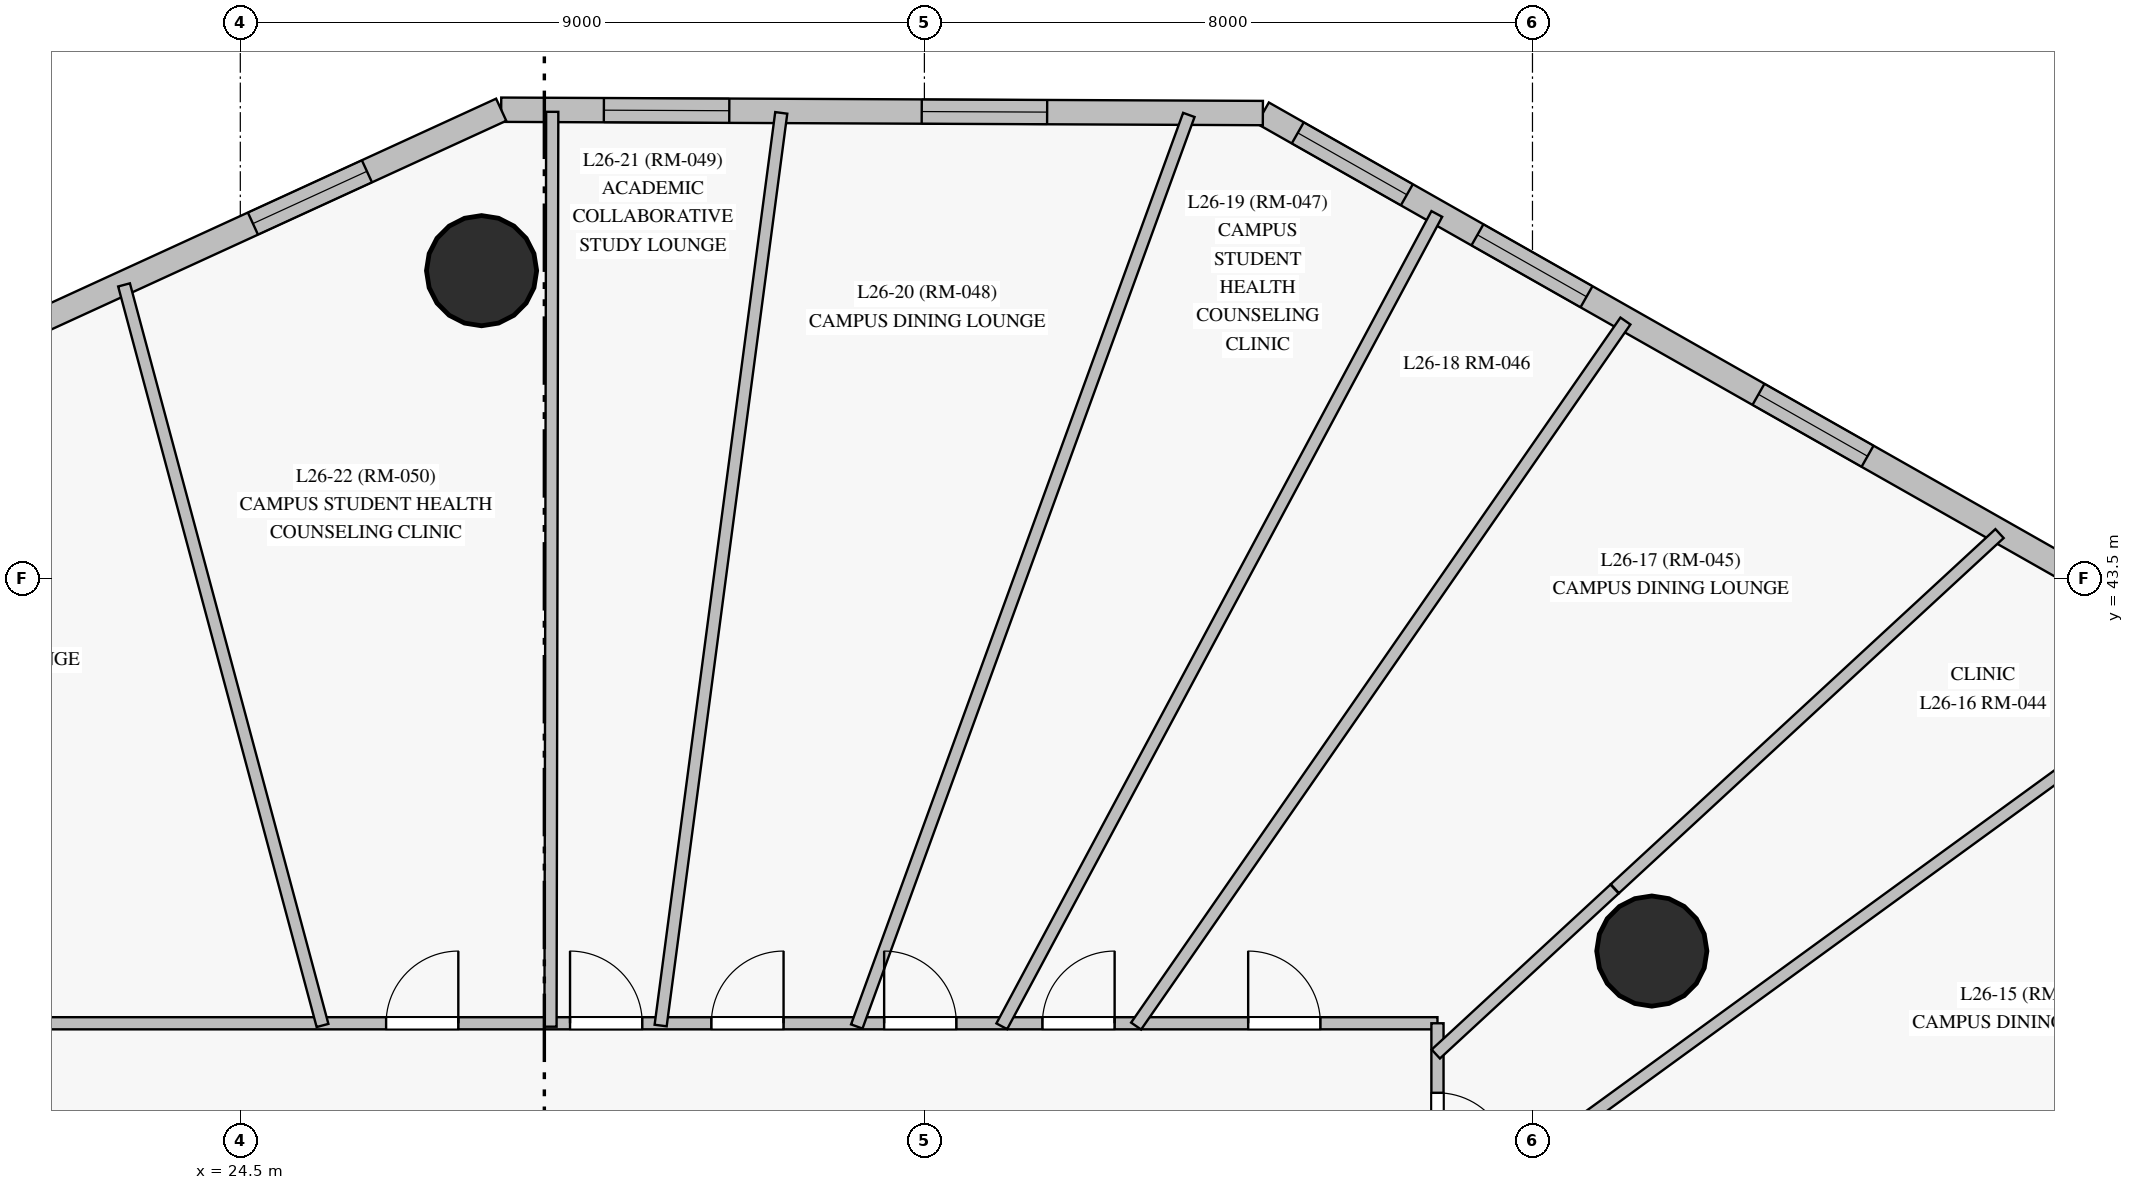
"""IFC4 building model, lengths in metres.
Left out: names, types, materials, properties, quantities, classifications, styles, units other than length and angle.
Written with IfcOpenShell. Run it as: python <this file> out.ifc"""

import sys

from ifc_helpers import new_model, si_unit, direction, frame, frame_2d, origin, origin_with_axes, origin_2d, place, context, subcontext, project, spatial, rectangle, circle, extrude, source, transform, mapped, element, fill, save


model = new_model("IFC4")
c1 = context("Model", 3, precision=1e-05, world=origin(), true_north=direction((0.0, 1.0)))
c2 = subcontext(c1, "Body", "Model", "MODEL_VIEW")
j1 = project(units=[si_unit("LENGTHUNIT", "METRE"), si_unit("PLANEANGLEUNIT", "RADIAN")], contexts=[c1])
p1 = place(None, origin())
s1 = spatial("IfcSite", under=j1, at=p1, CompositionType="ELEMENT")
p2 = place(p1, origin())
s2 = spatial("IfcBuilding", under=s1, at=p2, CompositionType="ELEMENT")
p3 = place(p2, frame((0.0, 0.0, 99.25)))
s3 = spatial("IfcBuildingStorey", under=s2, at=p3, CompositionType="ELEMENT", Elevation=99.25)
m1 = source(origin_with_axes(), c2, "Body", "SweptSolid", [
    extrude(circle(Radius=0.725, at=origin_2d()), origin(), (0.0, 0.0, 1.0), 3.05),
])
for number, where, z_axis, x_axis in (
    (1, (43.07, 38.6, 0.0), (0.0, 0.0, 1.0), (1.0, 0.0, 0.0)),
    (2, (27.674, 47.551, 0.0), (0.0, 0.0, 1.0), (1.0, 0.0, 0.0)),
):
    element("IfcColumn", number, at=place(p3, frame(where, z_axis=z_axis, x_axis=x_axis)), inside=s3, PredefinedType="COLUMN", context=c2, shape_type="MappedRepresentation", body=[
        mapped(m1, transform((0.0, 0.0, 0.0), scale=1.0)),
    ])
p4 = place(p3, frame((48.802, 43.468, 0.0), z_axis=(0.0, 0.0, 1.0), x_axis=(-0.869711119525, 0.49356110926, 0.0)))
e3 = element("IfcWall", 3, at=p4, inside=s3, PredefinedType="SOLIDWALL", context=c2, shape_type="SweptSolid", body=[
    extrude(rectangle(XDim=12.474, YDim=0.32, at=frame_2d((6.237, 0.0))), origin(), (0.0, 0.0, 1.0), 2.825),
])
p5 = place(p4, frame((3.327, 0.0, 0.85)))
e4 = element("IfcOpeningElement", 4, at=p5, cuts=e3, PredefinedType="OPENING", context=c2, shape_type="SweptSolid", body=[
    extrude(rectangle(XDim=1.65, YDim=1.65, at=frame_2d((0.825, 0.825))), frame((0.0, 0.17, 0.0), z_axis=(0.0, -1.0, 0.0), x_axis=(1.0, 0.0, 0.0)), (0.0, 0.0, 1.0), 0.34),
])
p6 = place(p4, frame((7.578, 0.0, 0.85)))
e5 = element("IfcOpeningElement", 5, at=p6, cuts=e3, PredefinedType="OPENING", context=c2, shape_type="SweptSolid", body=[
    extrude(rectangle(XDim=1.65, YDim=1.65, at=frame_2d((0.825, 0.825))), frame((0.0, 0.17, 0.0), z_axis=(0.0, -1.0, 0.0), x_axis=(1.0, 0.0, 0.0)), (0.0, 0.0, 1.0), 0.34),
])
p7 = place(p4, frame((10.296, 0.0, 0.85)))
e6 = element("IfcOpeningElement", 6, at=p7, cuts=e3, PredefinedType="OPENING", context=c2, shape_type="SweptSolid", body=[
    extrude(rectangle(XDim=1.65, YDim=1.65, at=frame_2d((0.825, 0.825))), frame((0.0, 0.17, 0.0), z_axis=(0.0, -1.0, 0.0), x_axis=(1.0, 0.0, 0.0)), (0.0, 0.0, 1.0), 0.34),
])
p8 = place(p3, frame((37.953, 49.625, 0.0), z_axis=(0.0, 0.0, 1.0), x_axis=(-0.999990384138, 0.004385388455, 0.0)))
e7 = element("IfcWall", 7, at=p8, inside=s3, PredefinedType="SOLIDWALL", context=c2, shape_type="SweptSolid", body=[
    extrude(rectangle(XDim=10.021, YDim=0.32, at=frame_2d((5.01, 0.0))), origin(), (0.0, 0.0, 1.0), 2.825),
])
p9 = place(p8, frame((2.838, 0.0, 0.85)))
e8 = element("IfcOpeningElement", 8, at=p9, cuts=e7, PredefinedType="OPENING", context=c2, shape_type="SweptSolid", body=[
    extrude(rectangle(XDim=1.65, YDim=1.65, at=frame_2d((0.825, 0.825))), frame((0.0, 0.17, 0.0), z_axis=(0.0, -1.0, 0.0), x_axis=(1.0, 0.0, 0.0)), (0.0, 0.0, 1.0), 0.34),
])
p10 = place(p8, frame((7.02, 0.0, 0.85)))
e9 = element("IfcOpeningElement", 9, at=p10, cuts=e7, PredefinedType="OPENING", context=c2, shape_type="SweptSolid", body=[
    extrude(rectangle(XDim=1.65, YDim=1.65, at=frame_2d((0.825, 0.825))), frame((0.0, 0.17, 0.0), z_axis=(0.0, -1.0, 0.0), x_axis=(1.0, 0.0, 0.0)), (0.0, 0.0, 1.0), 0.34),
])
p11 = place(p3, frame((27.932, 49.669, 0.0), z_axis=(0.0, 0.0, 1.0), x_axis=(-0.908921945333, -0.416966302345, 0.0)))
e10 = element("IfcWall", 10, at=p11, inside=s3, PredefinedType="SOLIDWALL", context=c2, shape_type="SweptSolid", body=[
    extrude(rectangle(XDim=14.514, YDim=0.32, at=frame_2d((7.257, 0.0))), origin(), (0.0, 0.0, 1.0), 2.825),
])
p12 = place(p11, frame((1.943, 0.0, 0.85)))
e11 = element("IfcOpeningElement", 11, at=p12, cuts=e10, PredefinedType="OPENING", context=c2, shape_type="SweptSolid", body=[
    extrude(rectangle(XDim=1.65, YDim=1.65, at=frame_2d((0.825, 0.825))), frame((0.0, 0.17, 0.0), z_axis=(0.0, -1.0, 0.0), x_axis=(1.0, 0.0, 0.0)), (0.0, 0.0, 1.0), 0.34),
])
p13 = place(p11, frame((6.767, 0.0, 0.85)))
e12 = element("IfcOpeningElement", 12, at=p13, cuts=e10, PredefinedType="OPENING", context=c2, shape_type="SweptSolid", body=[
    extrude(rectangle(XDim=1.65, YDim=1.65, at=frame_2d((0.825, 0.825))), frame((0.0, 0.17, 0.0), z_axis=(0.0, -1.0, 0.0), x_axis=(1.0, 0.0, 0.0)), (0.0, 0.0, 1.0), 0.34),
])
p14 = place(p11, frame((10.357, 0.0, 0.85)))
e13 = element("IfcOpeningElement", 13, at=p14, cuts=e10, PredefinedType="OPENING", context=c2, shape_type="SweptSolid", body=[
    extrude(rectangle(XDim=1.65, YDim=1.65, at=frame_2d((0.825, 0.825))), frame((0.0, 0.17, 0.0), z_axis=(0.0, -1.0, 0.0), x_axis=(1.0, 0.0, 0.0)), (0.0, 0.0, 1.0), 0.34),
])
p15 = place(p3, frame((10.613, 37.65, 0.0), z_axis=(0.0, 0.0, 1.0), x_axis=(1.0, 0.0, 0.0)))
e14 = element("IfcWall", 14, at=p15, inside=s3, PredefinedType="PARTITIONING", context=c2, shape_type="SweptSolid", body=[
    extrude(rectangle(XDim=29.637, YDim=0.16, at=frame_2d((14.819, 0.0))), origin(), (0.0, 0.0, 1.0), 2.325),
])
p16 = place(p15, frame((27.147, 0.0, 0.0)))
e15 = element("IfcOpeningElement", 15, at=p16, cuts=e14, PredefinedType="OPENING", context=c2, shape_type="SweptSolid", body=[
    extrude(rectangle(XDim=0.95, YDim=2.15, at=frame_2d((0.475, 1.075))), frame((0.0, 0.09, 0.0), z_axis=(0.0, -1.0, 0.0), x_axis=(1.0, 0.0, 0.0)), (0.0, 0.0, 1.0), 0.18),
])
p17 = place(p15, frame((24.44, 0.0, 0.0)))
e16 = element("IfcOpeningElement", 16, at=p17, cuts=e14, PredefinedType="OPENING", context=c2, shape_type="SweptSolid", body=[
    extrude(rectangle(XDim=0.95, YDim=2.15, at=frame_2d((0.475, 1.075))), frame((0.0, 0.09, 0.0), z_axis=(0.0, -1.0, 0.0), x_axis=(1.0, 0.0, 0.0)), (0.0, 0.0, 1.0), 0.18),
])
p18 = place(p15, frame((22.358, 0.0, 0.0)))
e17 = element("IfcOpeningElement", 17, at=p18, cuts=e14, PredefinedType="OPENING", context=c2, shape_type="SweptSolid", body=[
    extrude(rectangle(XDim=0.95, YDim=2.15, at=frame_2d((0.475, 1.075))), frame((0.0, 0.09, 0.0), z_axis=(0.0, -1.0, 0.0), x_axis=(1.0, 0.0, 0.0)), (0.0, 0.0, 1.0), 0.18),
])
p19 = place(p15, frame((20.084, 0.0, 0.0)))
e18 = element("IfcOpeningElement", 18, at=p19, cuts=e14, PredefinedType="OPENING", context=c2, shape_type="SweptSolid", body=[
    extrude(rectangle(XDim=0.95, YDim=2.15, at=frame_2d((0.475, 1.075))), frame((0.0, 0.09, 0.0), z_axis=(0.0, -1.0, 0.0), x_axis=(1.0, 0.0, 0.0)), (0.0, 0.0, 1.0), 0.18),
])
p20 = place(p15, frame((18.225, 0.0, 0.0)))
e19 = element("IfcOpeningElement", 19, at=p20, cuts=e14, PredefinedType="OPENING", context=c2, shape_type="SweptSolid", body=[
    extrude(rectangle(XDim=0.95, YDim=2.15, at=frame_2d((0.475, 1.075))), frame((0.0, 0.09, 0.0), z_axis=(0.0, -1.0, 0.0), x_axis=(1.0, 0.0, 0.0)), (0.0, 0.0, 1.0), 0.18),
])
p21 = place(p15, frame((15.805, 0.0, 0.0)))
e20 = element("IfcOpeningElement", 20, at=p21, cuts=e14, PredefinedType="OPENING", context=c2, shape_type="SweptSolid", body=[
    extrude(rectangle(XDim=0.95, YDim=2.15, at=frame_2d((0.475, 1.075))), frame((0.0, 0.09, 0.0), z_axis=(0.0, -1.0, 0.0), x_axis=(1.0, 0.0, 0.0)), (0.0, 0.0, 1.0), 0.18),
])
p22 = place(p15, frame((10.148, 0.0, 0.0)))
e21 = element("IfcOpeningElement", 21, at=p22, cuts=e14, PredefinedType="OPENING", context=c2, shape_type="SweptSolid", body=[
    extrude(rectangle(XDim=0.95, YDim=2.15, at=frame_2d((0.475, 1.075))), frame((0.0, 0.09, 0.0), z_axis=(0.0, -1.0, 0.0), x_axis=(1.0, 0.0, 0.0)), (0.0, 0.0, 1.0), 0.18),
])
p23 = place(p15, frame((7.296, 0.0, 0.0)))
e22 = element("IfcOpeningElement", 22, at=p23, cuts=e14, PredefinedType="OPENING", context=c2, shape_type="SweptSolid", body=[
    extrude(rectangle(XDim=0.95, YDim=2.15, at=frame_2d((0.475, 1.075))), frame((0.0, 0.09, 0.0), z_axis=(0.0, -1.0, 0.0), x_axis=(1.0, 0.0, 0.0)), (0.0, 0.0, 1.0), 0.18),
])
p24 = place(p3, frame((40.25, 37.65, 0.0), z_axis=(0.0, 0.0, 1.0), x_axis=(0.0, -1.0, 0.0)))
e23 = element("IfcWall", 23, at=p24, inside=s3, PredefinedType="PARTITIONING", context=c2, shape_type="SweptSolid", body=[
    extrude(rectangle(XDim=22.3, YDim=0.16, at=frame_2d((11.15, 0.0))), origin(), (0.0, 0.0, 1.0), 2.225),
])
p25 = place(p24, frame((18.866, 0.0, 0.0)))
e24 = element("IfcOpeningElement", 24, at=p25, cuts=e23, PredefinedType="OPENING", context=c2, shape_type="SweptSolid", body=[
    extrude(rectangle(XDim=0.95, YDim=2.15, at=frame_2d((0.475, 1.075))), frame((0.0, 0.09, 0.0), z_axis=(0.0, -1.0, 0.0), x_axis=(1.0, 0.0, 0.0)), (0.0, 0.0, 1.0), 0.18),
])
p26 = place(p24, frame((11.015, 0.0, 0.0)))
e25 = element("IfcOpeningElement", 25, at=p26, cuts=e23, PredefinedType="OPENING", context=c2, shape_type="SweptSolid", body=[
    extrude(rectangle(XDim=0.95, YDim=2.15, at=frame_2d((0.475, 1.075))), frame((0.0, 0.09, 0.0), z_axis=(0.0, -1.0, 0.0), x_axis=(1.0, 0.0, 0.0)), (0.0, 0.0, 1.0), 0.18),
])
p27 = place(p24, frame((8.866, 0.0, 0.0)))
e26 = element("IfcOpeningElement", 26, at=p27, cuts=e23, PredefinedType="OPENING", context=c2, shape_type="SweptSolid", body=[
    extrude(rectangle(XDim=0.95, YDim=2.15, at=frame_2d((0.475, 1.075))), frame((0.0, 0.09, 0.0), z_axis=(0.0, -1.0, 0.0), x_axis=(1.0, 0.0, 0.0)), (0.0, 0.0, 1.0), 0.18),
])
p28 = place(p24, frame((6.84, 0.0, 0.0)))
e27 = element("IfcOpeningElement", 27, at=p28, cuts=e23, PredefinedType="OPENING", context=c2, shape_type="SweptSolid", body=[
    extrude(rectangle(XDim=0.95, YDim=2.15, at=frame_2d((0.475, 1.075))), frame((0.0, 0.09, 0.0), z_axis=(0.0, -1.0, 0.0), x_axis=(1.0, 0.0, 0.0)), (0.0, 0.0, 1.0), 0.18),
])
p29 = place(p24, frame((4.56, 0.0, 0.0)))
e28 = element("IfcOpeningElement", 28, at=p29, cuts=e23, PredefinedType="OPENING", context=c2, shape_type="SweptSolid", body=[
    extrude(rectangle(XDim=0.95, YDim=2.15, at=frame_2d((0.475, 1.075))), frame((0.0, 0.09, 0.0), z_axis=(0.0, -1.0, 0.0), x_axis=(1.0, 0.0, 0.0)), (0.0, 0.0, 1.0), 0.18),
])
p30 = place(p24, frame((0.915, 0.0, 0.0)))
e29 = element("IfcOpeningElement", 29, at=p30, cuts=e23, PredefinedType="OPENING", context=c2, shape_type="SweptSolid", body=[
    extrude(rectangle(XDim=0.95, YDim=2.15, at=frame_2d((0.475, 1.075))), frame((0.0, 0.09, 0.0), z_axis=(0.0, -1.0, 0.0), x_axis=(1.0, 0.0, 0.0)), (0.0, 0.0, 1.0), 0.18),
])
p31 = place(p3, frame((32.61, 37.608, 0.0), z_axis=(0.0, 0.0, 1.0), x_axis=(0.342280552341, 0.939597798789, 0.0)))
e30 = element("IfcWall", 30, at=p31, inside=s3, PredefinedType="PARTITIONING", context=c2, shape_type="SweptSolid", body=[
    extrude(rectangle(XDim=12.763, YDim=0.16, at=frame_2d((6.382, 0.0))), origin(), (0.0, 0.0, 1.0), 2.825),
])
p32 = place(p3, frame((30.03, 37.62, 0.0), z_axis=(0.0, 0.0, 1.0), x_axis=(0.131010891984, 0.991380928897, 0.0)))
e31 = element("IfcWall", 31, at=p32, inside=s3, PredefinedType="PARTITIONING", context=c2, shape_type="SweptSolid", body=[
    extrude(rectangle(XDim=12.111, YDim=0.16, at=frame_2d((6.056, 0.0))), origin(), (0.0, 0.0, 1.0), 2.825),
])
p33 = place(p3, frame((34.518, 37.61, 0.0), z_axis=(0.0, 0.0, 1.0), x_axis=(0.472106285864, 0.881541635346, 0.0)))
e32 = element("IfcWall", 32, at=p33, inside=s3, PredefinedType="PARTITIONING", context=c2, shape_type="SweptSolid", body=[
    extrude(rectangle(XDim=12.123, YDim=0.16, at=frame_2d((6.062, 0.0))), origin(), (0.0, 0.0, 1.0), 2.825),
])
p34 = place(p3, frame((28.581, 37.605, 0.0), z_axis=(0.0, 0.0, 1.0), x_axis=(0.001886444644, 0.999998220662, 0.0)))
e33 = element("IfcWall", 33, at=p34, inside=s3, PredefinedType="PARTITIONING", context=c2, shape_type="SweptSolid", body=[
    extrude(rectangle(XDim=12.036, YDim=0.16, at=frame_2d((6.018, 0.0))), origin(), (0.0, 0.0, 1.0), 2.825),
])
p35 = place(p3, frame((40.209, 31.7, 0.0), z_axis=(0.0, 0.0, 1.0), x_axis=(0.912009584373, 0.410168889619, 0.0)))
e34 = element("IfcWall", 34, at=p35, inside=s3, PredefinedType="PARTITIONING", context=c2, shape_type="SweptSolid", body=[
    extrude(rectangle(XDim=11.926, YDim=0.16, at=frame_2d((5.963, 0.0))), origin(), (0.0, 0.0, 1.0), 2.825),
])
p36 = place(p3, frame((40.214, 34.947, 0.0), z_axis=(0.0, 0.0, 1.0), x_axis=(0.808655151719, 0.588282963887, 0.0)))
e35 = element("IfcWall", 35, at=p36, inside=s3, PredefinedType="PARTITIONING", context=c2, shape_type="SweptSolid", body=[
    extrude(rectangle(XDim=11.35, YDim=0.16, at=frame_2d((5.675, 0.0))), origin(), (0.0, 0.0, 1.0), 2.825),
])
p37 = place(p3, frame((36.285, 37.613, 0.0), z_axis=(0.0, 0.0, 1.0), x_axis=(0.570151843244, 0.821539332987, 0.0)))
e36 = element("IfcWall", 36, at=p37, inside=s3, PredefinedType="PARTITIONING", context=c2, shape_type="SweptSolid", body=[
    extrude(rectangle(XDim=11.291, YDim=0.16, at=frame_2d((5.646, 0.0))), origin(), (0.0, 0.0, 1.0), 2.825),
])
p38 = place(p3, frame((25.582, 37.621, 0.0), z_axis=(0.0, 0.0, 1.0), x_axis=(-0.258863116835, 0.965914016226, 0.0)))
e37 = element("IfcWall", 37, at=p38, inside=s3, PredefinedType="PARTITIONING", context=c2, shape_type="SweptSolid", body=[
    extrude(rectangle(XDim=10.087, YDim=0.16, at=frame_2d((5.043, 0.0))), origin(), (0.0, 0.0, 1.0), 2.825),
])
p39 = place(p3, frame((42.584, 39.42, 0.0), z_axis=(0.0, 0.0, 1.0), x_axis=(0.734757240963, 0.678330153283, 0.0)))
e38 = element("IfcWall", 38, at=p39, inside=s3, PredefinedType="PARTITIONING", context=c2, shape_type="SweptSolid", body=[
    extrude(rectangle(XDim=6.888, YDim=0.16, at=frame_2d((3.444, 0.0))), origin(), (0.0, 0.0, 1.0), 2.825),
])
p40 = place(p3, frame((40.228, 37.245, 0.0), z_axis=(0.0, 0.0, 1.0), x_axis=(0.734765427386, 0.678321285762, 0.0)))
e39 = element("IfcWall", 39, at=p40, inside=s3, PredefinedType="PARTITIONING", context=c2, shape_type="SweptSolid", body=[
    extrude(rectangle(XDim=3.201, YDim=0.16, at=frame_2d((1.6, 0.0))), origin(), (0.0, 0.0, 1.0), 2.225),
])
m2 = source(origin_with_axes(), c2, "Body", "SweptSolid", [
    extrude(rectangle(XDim=1.65, YDim=1.65, at=frame_2d((0.825, 0.825))), frame((0.0, 0.03, 0.0), z_axis=(0.0, -1.0, 0.0), x_axis=(1.0, 0.0, 0.0)), (0.0, 0.0, 1.0), 0.06),
])
p41 = place(p5, origin())
e40 = element("IfcWindow", 40, at=p41, inside=s3, PartitioningType="SINGLE_PANEL", PredefinedType="WINDOW", context=c2, shape_type="MappedRepresentation", body=[
    mapped(m2, transform((0.0, 0.0, 0.0), scale=1.0)),
])
fill(e4, e40)
p42 = place(p6, origin())
e41 = element("IfcWindow", 41, at=p42, inside=s3, PartitioningType="SINGLE_PANEL", PredefinedType="WINDOW", context=c2, shape_type="MappedRepresentation", body=[
    mapped(m2, transform((0.0, 0.0, 0.0), scale=1.0)),
])
fill(e5, e41)
p43 = place(p7, origin())
e42 = element("IfcWindow", 42, at=p43, inside=s3, PartitioningType="SINGLE_PANEL", PredefinedType="WINDOW", context=c2, shape_type="MappedRepresentation", body=[
    mapped(m2, transform((0.0, 0.0, 0.0), scale=1.0)),
])
fill(e6, e42)
p44 = place(p9, origin())
e43 = element("IfcWindow", 43, at=p44, inside=s3, PartitioningType="SINGLE_PANEL", PredefinedType="WINDOW", context=c2, shape_type="MappedRepresentation", body=[
    mapped(m2, transform((0.0, 0.0, 0.0), scale=1.0)),
])
fill(e8, e43)
p45 = place(p10, origin())
e44 = element("IfcWindow", 44, at=p45, inside=s3, PartitioningType="SINGLE_PANEL", PredefinedType="WINDOW", context=c2, shape_type="MappedRepresentation", body=[
    mapped(m2, transform((0.0, 0.0, 0.0), scale=1.0)),
])
fill(e9, e44)
p46 = place(p12, origin())
e45 = element("IfcWindow", 45, at=p46, inside=s3, PartitioningType="SINGLE_PANEL", PredefinedType="WINDOW", context=c2, shape_type="MappedRepresentation", body=[
    mapped(m2, transform((0.0, 0.0, 0.0), scale=1.0)),
])
fill(e11, e45)
m3 = source(origin_with_axes(), c2, "Body", "SweptSolid", [
    extrude(rectangle(XDim=0.95, YDim=2.15, at=frame_2d((0.475, 1.075))), frame((0.0, 0.025, 0.0), z_axis=(0.0, -1.0, 0.0), x_axis=(1.0, 0.0, 0.0)), (0.0, 0.0, 1.0), 0.05),
])
p47 = place(p30, origin())
e46 = element("IfcDoor", 46, at=p47, inside=s3, OperationType="SINGLE_SWING_RIGHT", PredefinedType="DOOR", context=c2, shape_type="MappedRepresentation", body=[
    mapped(m3, transform((0.0, 0.0, 0.0), scale=1.0)),
])
fill(e29, e46)
p48 = place(p16, origin())
e47 = element("IfcDoor", 47, at=p48, inside=s3, OperationType="SINGLE_SWING_LEFT", PredefinedType="DOOR", context=c2, shape_type="MappedRepresentation", body=[
    mapped(m3, transform((0.0, 0.0, 0.0), scale=1.0)),
])
fill(e15, e47)
p49 = place(p17, origin())
e48 = element("IfcDoor", 48, at=p49, inside=s3, OperationType="SINGLE_SWING_RIGHT", PredefinedType="DOOR", context=c2, shape_type="MappedRepresentation", body=[
    mapped(m3, transform((0.0, 0.0, 0.0), scale=1.0)),
])
fill(e16, e48)
p50 = place(p18, origin())
e49 = element("IfcDoor", 49, at=p50, inside=s3, OperationType="SINGLE_SWING_LEFT", PredefinedType="DOOR", context=c2, shape_type="MappedRepresentation", body=[
    mapped(m3, transform((0.0, 0.0, 0.0), scale=1.0)),
])
fill(e17, e49)
p51 = place(p19, origin())
e50 = element("IfcDoor", 50, at=p51, inside=s3, OperationType="SINGLE_SWING_RIGHT", PredefinedType="DOOR", context=c2, shape_type="MappedRepresentation", body=[
    mapped(m3, transform((0.0, 0.0, 0.0), scale=1.0)),
])
fill(e18, e50)
p52 = place(p20, origin())
e51 = element("IfcDoor", 51, at=p52, inside=s3, OperationType="SINGLE_SWING_LEFT", PredefinedType="DOOR", context=c2, shape_type="MappedRepresentation", body=[
    mapped(m3, transform((0.0, 0.0, 0.0), scale=1.0)),
])
fill(e19, e51)
p53 = place(p21, origin())
e52 = element("IfcDoor", 52, at=p53, inside=s3, OperationType="SINGLE_SWING_RIGHT", PredefinedType="DOOR", context=c2, shape_type="MappedRepresentation", body=[
    mapped(m3, transform((0.0, 0.0, 0.0), scale=1.0)),
])
fill(e20, e52)
save(model, sys.argv[1])
